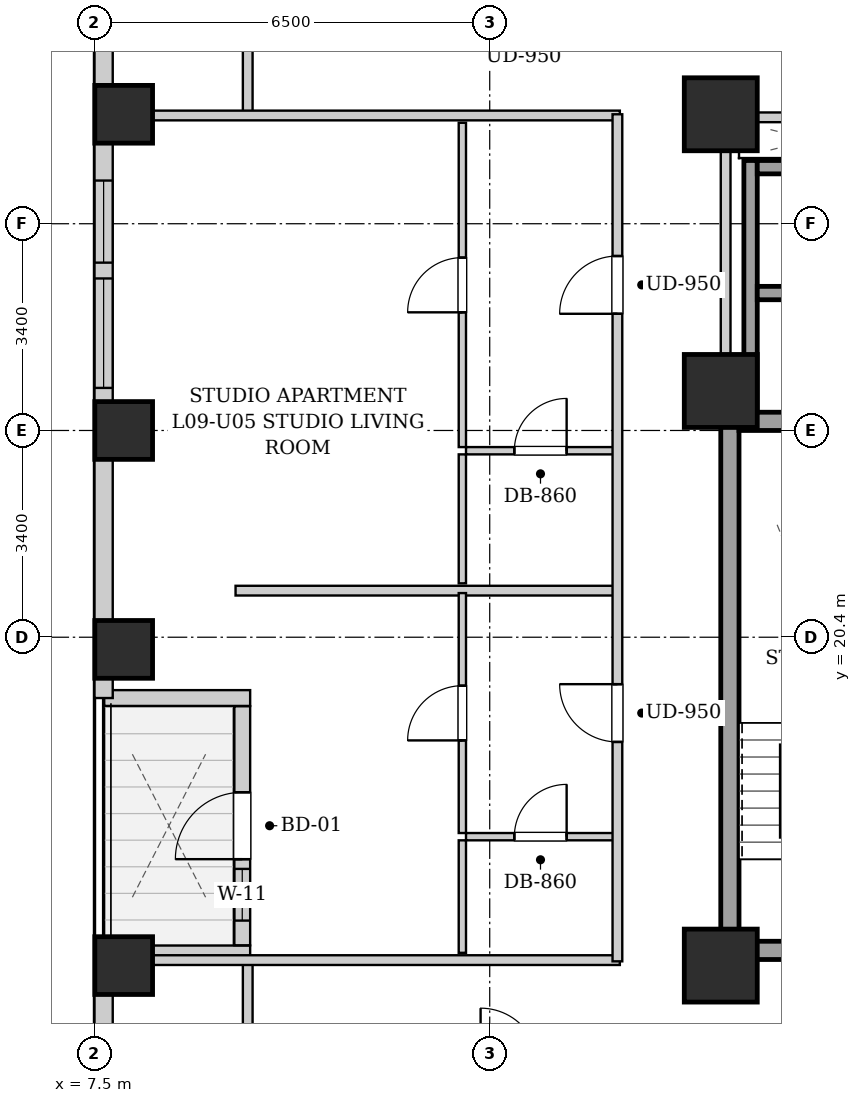
"""IFC4 building model, lengths in metres.
Left out: names, types, materials, properties, quantities, classifications, styles, units other than length and angle.
Written with IfcOpenShell. Run it as: python <this file> out.ifc"""

import sys

from ifc_helpers import new_model, si_unit, direction, frame, frame_2d, origin, origin_2d, place, context, subcontext, project, spatial, rectangle, extrude, element, fill, save


model = new_model("IFC4")
c1 = context("Model", 3, precision=1e-05, world=origin(), true_north=direction((0.0, 1.0)))
c2 = subcontext(c1, "Body", "Model", "MODEL_VIEW")
j1 = project(units=[si_unit("LENGTHUNIT", "METRE"), si_unit("PLANEANGLEUNIT", "RADIAN")], contexts=[c1])
p1 = place(None, origin())
s1 = spatial("IfcSite", under=j1, at=p1, CompositionType="ELEMENT")
p2 = place(p1, origin())
s2 = spatial("IfcBuilding", under=s1, at=p2, CompositionType="ELEMENT")
p3 = place(p2, frame((0.0, 0.0, 38.6)))
s3 = spatial("IfcBuildingStorey", under=s2, at=p3, CompositionType="ELEMENT", Elevation=38.6)
for number, where, z_axis, x_axis in (
    (1, (7.98, 15.0, 0.0), (0.0, 0.0, 1.0), (1.0, 0.0, 0.0)),
    (2, (7.98, 20.2, 0.0), (0.0, 0.0, 1.0), (1.0, 0.0, 0.0)),
    (3, (7.98, 23.8, 0.0), (0.0, 0.0, 1.0), (1.0, 0.0, 0.0)),
    (4, (7.98, 29.0, 0.0), (0.0, 0.0, 1.0), (1.0, 0.0, 0.0)),
):
    element("IfcColumn", number, at=place(p3, frame(where, z_axis=z_axis, x_axis=x_axis)), inside=s3, PredefinedType="COLUMN", context=c2, shape_type="SweptSolid", body=[
        extrude(rectangle(XDim=0.95, YDim=0.95, at=origin_2d()), origin(), (0.0, 0.0, 1.0), 3.2),
    ])
for number, where, z_axis, x_axis in (
    (5, (17.8, 15.0, 0.0), (0.0, 0.0, 1.0), (1.0, 0.0, 0.0)),
    (6, (17.8, 29.0, 0.0), (0.0, 0.0, 1.0), (1.0, 0.0, 0.0)),
    (7, (17.8, 24.45, 0.0), (0.0, 0.0, 1.0), (1.0, 0.0, 0.0)),
):
    element("IfcColumn", number, at=place(p3, frame(where, z_axis=z_axis, x_axis=x_axis)), inside=s3, PredefinedType="COLUMN", context=c2, shape_type="SweptSolid", body=[
        extrude(rectangle(XDim=1.2, YDim=1.2, at=origin_2d()), origin(), (0.0, 0.0, 1.0), 3.2),
    ])
p4 = place(p3, frame((7.65, 2.5, 0.0), z_axis=(0.0, 0.0, 1.0), x_axis=(0.0, 1.0, 0.0)))
e8 = element("IfcWall", 8, at=p4, inside=s3, PredefinedType="SOLIDWALL", context=c2, shape_type="SweptSolid", body=[
    extrude(rectangle(XDim=12.7, YDim=0.3, at=frame_2d((6.35, 0.0))), origin(), (0.0, 0.0, 1.0), 1.975),
])
p5 = place(p4, frame((3.257, 0.0, 0.55)))
e9 = element("IfcOpeningElement", 9, at=p5, cuts=e8, PredefinedType="OPENING", context=c2, shape_type="SweptSolid", body=[
    extrude(rectangle(XDim=1.8, YDim=1.2, at=frame_2d((0.9, 0.6))), frame((0.0, 0.16, 0.0), z_axis=(0.0, -1.0, 0.0), x_axis=(1.0, 0.0, 0.0)), (0.0, 0.0, 1.0), 0.32),
])
p6 = place(p4, frame((1.185, 0.0, 0.55)))
e10 = element("IfcOpeningElement", 10, at=p6, cuts=e8, PredefinedType="OPENING", context=c2, shape_type="SweptSolid", body=[
    extrude(rectangle(XDim=1.35, YDim=1.2, at=frame_2d((0.675, 0.6))), frame((0.0, 0.16, 0.0), z_axis=(0.0, -1.0, 0.0), x_axis=(1.0, 0.0, 0.0)), (0.0, 0.0, 1.0), 0.32),
])
p7 = place(p3, frame((7.66, 15.2, 0.0), z_axis=(0.0, 0.0, 1.0), x_axis=(1.0, 0.0, 0.0)))
e11 = element("IfcWall", 11, at=p7, inside=s3, PredefinedType="SOLIDWALL", context=c2, shape_type="SweptSolid", body=[
    extrude(rectangle(XDim=2.4, YDim=0.26, at=frame_2d((1.2, 0.0))), origin(), (0.0, 0.0, 1.0), 2.94),
])
p8 = place(p3, frame((9.93, 15.334, 0.0), z_axis=(0.0, 0.0, 1.0), x_axis=(0.0, 1.0, 0.0)))
e12 = element("IfcWall", 12, at=p8, inside=s3, PredefinedType="SOLIDWALL", context=c2, shape_type="SweptSolid", body=[
    extrude(rectangle(XDim=3.932, YDim=0.26, at=frame_2d((1.966, 0.0))), origin(), (0.0, 0.0, 1.0), 2.94),
])
p9 = place(p8, frame((1.416, 0.0, 0.0)))
e13 = element("IfcOpeningElement", 13, at=p9, cuts=e12, PredefinedType="OPENING", context=c2, shape_type="SweptSolid", body=[
    extrude(rectangle(XDim=1.1, YDim=2.0, at=frame_2d((0.55, 1.0))), frame((0.0, 0.14, 0.0), z_axis=(0.0, -1.0, 0.0), x_axis=(1.0, 0.0, 0.0)), (0.0, 0.0, 1.0), 0.28),
])
p10 = place(p8, frame((0.406, 0.0, 0.55)))
e14 = element("IfcOpeningElement", 14, at=p10, cuts=e12, PredefinedType="OPENING", context=c2, shape_type="SweptSolid", body=[
    extrude(rectangle(XDim=0.85, YDim=1.2, at=frame_2d((0.425, 0.6))), frame((0.0, 0.14, 0.0), z_axis=(0.0, -1.0, 0.0), x_axis=(1.0, 0.0, 0.0)), (0.0, 0.0, 1.0), 0.28),
])
p11 = place(p3, frame((10.06, 19.4, 0.0), z_axis=(0.0, 0.0, 1.0), x_axis=(-1.0, 0.0, 0.0)))
e15 = element("IfcWall", 15, at=p11, inside=s3, PredefinedType="SOLIDWALL", context=c2, shape_type="SweptSolid", body=[
    extrude(rectangle(XDim=2.4, YDim=0.26, at=frame_2d((1.2, 0.0))), origin(), (0.0, 0.0, 1.0), 2.94),
])
p12 = place(p3, frame((7.65, 19.4, 0.0), z_axis=(0.0, 0.0, 1.0), x_axis=(0.0, 1.0, 0.0)))
e16 = element("IfcWall", 16, at=p12, inside=s3, PredefinedType="SOLIDWALL", context=c2, shape_type="SweptSolid", body=[
    extrude(rectangle(XDim=25.7, YDim=0.3, at=frame_2d((12.85, 0.0))), origin(), (0.0, 0.0, 1.0), 1.975),
])
p13 = place(p12, frame((20.235, 0.0, 0.55)))
e17 = element("IfcOpeningElement", 17, at=p13, cuts=e16, PredefinedType="OPENING", context=c2, shape_type="SweptSolid", body=[
    extrude(rectangle(XDim=1.8, YDim=1.2, at=frame_2d((0.9, 0.6))), frame((0.0, 0.16, 0.0), z_axis=(0.0, -1.0, 0.0), x_axis=(1.0, 0.0, 0.0)), (0.0, 0.0, 1.0), 0.32),
])
p14 = place(p12, frame((14.635, 0.0, 0.55)))
e18 = element("IfcOpeningElement", 18, at=p14, cuts=e16, PredefinedType="OPENING", context=c2, shape_type="SweptSolid", body=[
    extrude(rectangle(XDim=1.35, YDim=1.2, at=frame_2d((0.675, 0.6))), frame((0.0, 0.16, 0.0), z_axis=(0.0, -1.0, 0.0), x_axis=(1.0, 0.0, 0.0)), (0.0, 0.0, 1.0), 0.32),
])
p15 = place(p12, frame((5.1, 0.0, 0.55)))
e19 = element("IfcOpeningElement", 19, at=p15, cuts=e16, PredefinedType="OPENING", context=c2, shape_type="SweptSolid", body=[
    extrude(rectangle(XDim=1.8, YDim=1.2, at=frame_2d((0.9, 0.6))), frame((0.0, 0.16, 0.0), z_axis=(0.0, -1.0, 0.0), x_axis=(1.0, 0.0, 0.0)), (0.0, 0.0, 1.0), 0.32),
])
p16 = place(p12, frame((7.16, 0.0, 0.55)))
e20 = element("IfcOpeningElement", 20, at=p16, cuts=e16, PredefinedType="OPENING", context=c2, shape_type="SweptSolid", body=[
    extrude(rectangle(XDim=1.35, YDim=1.2, at=frame_2d((0.675, 0.6))), frame((0.0, 0.16, 0.0), z_axis=(0.0, -1.0, 0.0), x_axis=(1.0, 0.0, 0.0)), (0.0, 0.0, 1.0), 0.32),
])
p17 = place(p3, frame((17.95, 15.1, 0.0), z_axis=(0.0, 0.0, 1.0), x_axis=(0.0, 1.0, 0.0)))
e21 = element("IfcWall", 21, at=p17, inside=s3, PredefinedType="SHEAR", context=c2, shape_type="SweptSolid", body=[
    extrude(rectangle(XDim=9.0, YDim=0.3, at=frame_2d((4.5, 0.0))), origin(), (0.0, 0.0, 1.0), 2.94),
])
p18 = place(p3, frame((18.1, 23.95, 0.0), z_axis=(0.0, 0.0, 1.0), x_axis=(1.0, 0.0, 0.0)))
e22 = element("IfcWall", 22, at=p18, inside=s3, PredefinedType="SHEAR", context=c2, shape_type="SweptSolid", body=[
    extrude(rectangle(XDim=2.85, YDim=0.3, at=frame_2d((1.425, 0.0))), origin(), (0.0, 0.0, 1.0), 2.94),
])
p19 = place(p3, frame((18.1, 15.25, 0.0), z_axis=(0.0, 0.0, 1.0), x_axis=(1.0, 0.0, 0.0)))
e23 = element("IfcWall", 23, at=p19, inside=s3, PredefinedType="SHEAR", context=c2, shape_type="SweptSolid", body=[
    extrude(rectangle(XDim=2.85, YDim=0.3, at=frame_2d((1.425, 0.0))), origin(), (0.0, 0.0, 1.0), 2.94),
])
p20 = place(p19, frame((0.86, 0.0, 0.0)))
e24 = element("IfcOpeningElement", 24, at=p20, cuts=e23, PredefinedType="OPENING", context=c2, shape_type="SweptSolid", body=[
    extrude(rectangle(XDim=1.1, YDim=2.05, at=frame_2d((0.55, 1.025))), frame((0.0, 0.16, 0.0), z_axis=(0.0, -1.0, 0.0), x_axis=(1.0, 0.0, 0.0)), (0.0, 0.0, 1.0), 0.32),
])
p21 = place(p3, frame((18.29, 24.1, 0.0), z_axis=(0.0, 0.0, 1.0), x_axis=(0.0, 1.0, 0.0)))
e25 = element("IfcWall", 25, at=p21, inside=s3, PredefinedType="SHEAR", context=c2, shape_type="SweptSolid", body=[
    extrude(rectangle(XDim=4.14, YDim=0.22, at=frame_2d((2.07, 0.0))), origin(), (0.0, 0.0, 1.0), 2.94),
])
for number, where, z_axis, x_axis in (
    (26, (18.4, 26.06, 0.0), (0.0, 0.0, 1.0), (1.0, 0.0, 0.0)),
    (27, (18.4, 28.13, 0.0), (0.0, 0.0, 1.0), (1.0, 0.0, 0.0)),
):
    element("IfcWall", number, at=place(p3, frame(where, z_axis=z_axis, x_axis=x_axis)), inside=s3, PredefinedType="SHEAR", context=c2, shape_type="SweptSolid", body=[
        extrude(rectangle(XDim=1.9, YDim=0.22, at=frame_2d((0.95, 0.0))), origin(), (0.0, 0.0, 1.0), 2.94),
    ])
p22 = place(p3, frame((17.88, 24.12, 0.0), z_axis=(0.0, 0.0, 1.0), x_axis=(0.0, 1.0, 0.0)))
e28 = element("IfcWall", 28, at=p22, inside=s3, PredefinedType="PARTITIONING", context=c2, shape_type="SweptSolid", body=[
    extrude(rectangle(XDim=4.76, YDim=0.16, at=frame_2d((2.38, 0.0))), origin(), (0.0, 0.0, 1.0), 2.275),
])
p23 = place(p3, frame((17.96, 28.95, 0.0), z_axis=(0.0, 0.0, 1.0), x_axis=(1.0, 0.0, 0.0)))
e29 = element("IfcWall", 29, at=p23, inside=s3, PredefinedType="PARTITIONING", context=c2, shape_type="SweptSolid", body=[
    extrude(rectangle(XDim=4.29, YDim=0.16, at=frame_2d((2.145, 0.0))), origin(), (0.0, 0.0, 1.0), 2.155),
])
p24 = place(p23, frame((1.57, 0.0, 0.0)))
e30 = element("IfcOpeningElement", 30, at=p24, cuts=e29, PredefinedType="OPENING", context=c2, shape_type="SweptSolid", body=[
    extrude(rectangle(XDim=0.86, YDim=2.05, at=frame_2d((0.43, 1.025))), frame((0.0, 0.09, 0.0), z_axis=(0.0, -1.0, 0.0), x_axis=(1.0, 0.0, 0.0)), (0.0, 0.0, 1.0), 0.18),
])
for number, where, z_axis, x_axis in (
    (31, (10.02, 13.35, 0.0), (0.0, 0.0, 1.0), (0.0, 1.0, 0.0)),
    (32, (10.02, 28.98, 0.0), (0.0, 0.0, 1.0), (0.0, 1.0, 0.0)),
):
    element("IfcWall", number, at=place(p3, frame(where, z_axis=z_axis, x_axis=x_axis)), inside=s3, PredefinedType="PARTITIONING", context=c2, shape_type="SweptSolid", body=[
        extrude(rectangle(XDim=1.74, YDim=0.16, at=frame_2d((0.87, 0.0))), origin(), (0.0, 0.0, 1.0), 2.94),
    ])
for number, where, z_axis, x_axis in (
    (33, (7.78, 15.09, 0.0), (0.0, 0.0, 1.0), (1.0, 0.0, 0.0)),
    (34, (7.78, 28.98, 0.0), (0.0, 0.0, 1.0), (1.0, 0.0, 0.0)),
):
    element("IfcWall", number, at=place(p3, frame(where, z_axis=z_axis, x_axis=x_axis)), inside=s3, PredefinedType="PARTITIONING", context=c2, shape_type="SweptSolid", body=[
        extrude(rectangle(XDim=8.36, YDim=0.16, at=frame_2d((4.18, 0.0))), origin(), (0.0, 0.0, 1.0), 2.155),
    ])
p25 = place(p3, frame((9.82, 21.166, 0.0), z_axis=(0.0, 0.0, 1.0), x_axis=(1.0, 0.0, 0.0)))
e35 = element("IfcWall", 35, at=p25, inside=s3, PredefinedType="PARTITIONING", context=c2, shape_type="SweptSolid", body=[
    extrude(rectangle(XDim=6.24, YDim=0.16, at=frame_2d((3.12, 0.0))), origin(), (0.0, 0.0, 1.0), 2.94),
])
p26 = place(p3, frame((13.61, 17.12, 0.0), z_axis=(0.0, 0.0, 1.0), x_axis=(1.0, 0.0, 0.0)))
e36 = element("IfcWall", 36, at=p26, inside=s3, PredefinedType="PARTITIONING", context=c2, shape_type="SweptSolid", body=[
    extrude(rectangle(XDim=2.45, YDim=0.12, at=frame_2d((1.225, 0.0))), origin(), (0.0, 0.0, 1.0), 2.94),
])
p27 = place(p26, frame((0.795, 0.0, 0.0)))
e37 = element("IfcOpeningElement", 37, at=p27, cuts=e36, PredefinedType="OPENING", context=c2, shape_type="SweptSolid", body=[
    extrude(rectangle(XDim=0.86, YDim=2.05, at=frame_2d((0.43, 1.025))), frame((0.0, 0.07, 0.0), z_axis=(0.0, -1.0, 0.0), x_axis=(1.0, 0.0, 0.0)), (0.0, 0.0, 1.0), 0.14),
])
p28 = place(p3, frame((13.55, 15.21, 0.0), z_axis=(0.0, 0.0, 1.0), x_axis=(0.0, 1.0, 0.0)))
e38 = element("IfcWall", 38, at=p28, inside=s3, PredefinedType="PARTITIONING", context=c2, shape_type="SweptSolid", body=[
    extrude(rectangle(XDim=1.85, YDim=0.12, at=frame_2d((0.925, 0.0))), origin(), (0.0, 0.0, 1.0), 2.94),
])
p29 = place(p3, frame((13.55, 17.18, 0.0), z_axis=(0.0, 0.0, 1.0), x_axis=(0.0, 1.0, 0.0)))
e39 = element("IfcWall", 39, at=p29, inside=s3, PredefinedType="PARTITIONING", context=c2, shape_type="SweptSolid", body=[
    extrude(rectangle(XDim=3.946, YDim=0.12, at=frame_2d((1.973, 0.0))), origin(), (0.0, 0.0, 1.0), 2.94),
])
p30 = place(p29, frame((1.523, 0.0, 0.0)))
e40 = element("IfcOpeningElement", 40, at=p30, cuts=e39, PredefinedType="OPENING", context=c2, shape_type="SweptSolid", body=[
    extrude(rectangle(XDim=0.9, YDim=2.05, at=frame_2d((0.45, 1.025))), frame((0.0, 0.07, 0.0), z_axis=(0.0, -1.0, 0.0), x_axis=(1.0, 0.0, 0.0)), (0.0, 0.0, 1.0), 0.14),
])
p31 = place(p3, frame((13.61, 23.467, 0.0), z_axis=(0.0, 0.0, 1.0), x_axis=(1.0, 0.0, 0.0)))
e41 = element("IfcWall", 41, at=p31, inside=s3, PredefinedType="PARTITIONING", context=c2, shape_type="SweptSolid", body=[
    extrude(rectangle(XDim=2.45, YDim=0.12, at=frame_2d((1.225, 0.0))), origin(), (0.0, 0.0, 1.0), 2.94),
])
p32 = place(p31, frame((0.795, 0.0, 0.0)))
e42 = element("IfcOpeningElement", 42, at=p32, cuts=e41, PredefinedType="OPENING", context=c2, shape_type="SweptSolid", body=[
    extrude(rectangle(XDim=0.86, YDim=2.05, at=frame_2d((0.43, 1.025))), frame((0.0, 0.07, 0.0), z_axis=(0.0, -1.0, 0.0), x_axis=(1.0, 0.0, 0.0)), (0.0, 0.0, 1.0), 0.14),
])
p33 = place(p3, frame((13.55, 21.286, 0.0), z_axis=(0.0, 0.0, 1.0), x_axis=(0.0, 1.0, 0.0)))
e43 = element("IfcWall", 43, at=p33, inside=s3, PredefinedType="PARTITIONING", context=c2, shape_type="SweptSolid", body=[
    extrude(rectangle(XDim=2.121, YDim=0.12, at=frame_2d((1.061, 0.0))), origin(), (0.0, 0.0, 1.0), 2.94),
])
p34 = place(p3, frame((13.55, 23.527, 0.0), z_axis=(0.0, 0.0, 1.0), x_axis=(0.0, 1.0, 0.0)))
e44 = element("IfcWall", 44, at=p34, inside=s3, PredefinedType="PARTITIONING", context=c2, shape_type="SweptSolid", body=[
    extrude(rectangle(XDim=5.333, YDim=0.12, at=frame_2d((2.667, 0.0))), origin(), (0.0, 0.0, 1.0), 2.94),
])
p35 = place(p34, frame((2.216, 0.0, 0.0)))
e45 = element("IfcOpeningElement", 45, at=p35, cuts=e44, PredefinedType="OPENING", context=c2, shape_type="SweptSolid", body=[
    extrude(rectangle(XDim=0.9, YDim=2.05, at=frame_2d((0.45, 1.025))), frame((0.0, 0.07, 0.0), z_axis=(0.0, -1.0, 0.0), x_axis=(1.0, 0.0, 0.0)), (0.0, 0.0, 1.0), 0.14),
])
p36 = place(p3, frame((16.1, 15.07, 0.0), z_axis=(0.0, 0.0, 1.0), x_axis=(0.0, 1.0, 0.0)))
e46 = element("IfcWall", 46, at=p36, inside=s3, PredefinedType="PARTITIONING", context=c2, shape_type="SweptSolid", body=[
    extrude(rectangle(XDim=13.93, YDim=0.16, at=frame_2d((6.965, 0.0))), origin(), (0.0, 0.0, 1.0), 2.94),
])
p37 = place(p36, frame((3.608, 0.0, 0.0)))
e47 = element("IfcOpeningElement", 47, at=p37, cuts=e46, PredefinedType="OPENING", context=c2, shape_type="SweptSolid", body=[
    extrude(rectangle(XDim=0.95, YDim=2.1, at=frame_2d((0.475, 1.05))), frame((0.0, 0.09, 0.0), z_axis=(0.0, -1.0, 0.0), x_axis=(1.0, 0.0, 0.0)), (0.0, 0.0, 1.0), 0.18),
])
p38 = place(p36, frame((10.649, 0.0, 0.0)))
e48 = element("IfcOpeningElement", 48, at=p38, cuts=e46, PredefinedType="OPENING", context=c2, shape_type="SweptSolid", body=[
    extrude(rectangle(XDim=0.95, YDim=2.1, at=frame_2d((0.475, 1.05))), frame((0.0, 0.09, 0.0), z_axis=(0.0, -1.0, 0.0), x_axis=(1.0, 0.0, 0.0)), (0.0, 0.0, 1.0), 0.18),
])
p39 = place(p27, origin())
e49 = element("IfcDoor", 49, at=p39, inside=s3, OperationType="SINGLE_SWING_RIGHT", PredefinedType="DOOR", context=c2, shape_type="SweptSolid", body=[
    extrude(rectangle(XDim=0.86, YDim=2.05, at=frame_2d((0.43, 1.025))), frame((0.0, 0.025, 0.0), z_axis=(0.0, -1.0, 0.0), x_axis=(1.0, 0.0, 0.0)), (0.0, 0.0, 1.0), 0.05),
])
fill(e37, e49)
p40 = place(p30, origin())
e50 = element("IfcDoor", 50, at=p40, inside=s3, OperationType="SINGLE_SWING_LEFT", PredefinedType="DOOR", context=c2, shape_type="SweptSolid", body=[
    extrude(rectangle(XDim=0.9, YDim=2.05, at=frame_2d((0.45, 1.025))), frame((0.0, 0.025, 0.0), z_axis=(0.0, -1.0, 0.0), x_axis=(1.0, 0.0, 0.0)), (0.0, 0.0, 1.0), 0.05),
])
fill(e40, e50)
p41 = place(p32, origin())
e51 = element("IfcDoor", 51, at=p41, inside=s3, OperationType="SINGLE_SWING_RIGHT", PredefinedType="DOOR", context=c2, shape_type="SweptSolid", body=[
    extrude(rectangle(XDim=0.86, YDim=2.05, at=frame_2d((0.43, 1.025))), frame((0.0, 0.025, 0.0), z_axis=(0.0, -1.0, 0.0), x_axis=(1.0, 0.0, 0.0)), (0.0, 0.0, 1.0), 0.05),
])
fill(e42, e51)
p42 = place(p35, origin())
e52 = element("IfcDoor", 52, at=p42, inside=s3, OperationType="SINGLE_SWING_LEFT", PredefinedType="DOOR", context=c2, shape_type="SweptSolid", body=[
    extrude(rectangle(XDim=0.9, YDim=2.05, at=frame_2d((0.45, 1.025))), frame((0.0, 0.025, 0.0), z_axis=(0.0, -1.0, 0.0), x_axis=(1.0, 0.0, 0.0)), (0.0, 0.0, 1.0), 0.05),
])
fill(e45, e52)
p43 = place(p37, origin())
e53 = element("IfcDoor", 53, at=p43, inside=s3, OperationType="SINGLE_SWING_RIGHT", PredefinedType="DOOR", context=c2, shape_type="SweptSolid", body=[
    extrude(rectangle(XDim=0.95, YDim=2.1, at=frame_2d((0.475, 1.05))), frame((0.0, 0.025, 0.0), z_axis=(0.0, -1.0, 0.0), x_axis=(1.0, 0.0, 0.0)), (0.0, 0.0, 1.0), 0.05),
])
fill(e47, e53)
p44 = place(p38, origin())
e54 = element("IfcDoor", 54, at=p44, inside=s3, OperationType="SINGLE_SWING_LEFT", PredefinedType="DOOR", context=c2, shape_type="SweptSolid", body=[
    extrude(rectangle(XDim=0.95, YDim=2.1, at=frame_2d((0.475, 1.05))), frame((0.0, 0.025, 0.0), z_axis=(0.0, -1.0, 0.0), x_axis=(1.0, 0.0, 0.0)), (0.0, 0.0, 1.0), 0.05),
])
fill(e48, e54)
p45 = place(p9, origin())
e55 = element("IfcDoor", 55, at=p45, inside=s3, OperationType="SINGLE_SWING_LEFT", PredefinedType="DOOR", context=c2, shape_type="SweptSolid", body=[
    extrude(rectangle(XDim=1.1, YDim=2.0, at=frame_2d((0.55, 1.0))), frame((0.0, 0.025, 0.0), z_axis=(0.0, -1.0, 0.0), x_axis=(1.0, 0.0, 0.0)), (0.0, 0.0, 1.0), 0.05),
])
fill(e13, e55)
p46 = place(p10, origin())
e56 = element("IfcWindow", 56, at=p46, inside=s3, PartitioningType="SINGLE_PANEL", PredefinedType="WINDOW", context=c2, shape_type="SweptSolid", body=[
    extrude(rectangle(XDim=0.85, YDim=1.2, at=frame_2d((0.425, 0.6))), frame((0.0, 0.03, 0.0), z_axis=(0.0, -1.0, 0.0), x_axis=(1.0, 0.0, 0.0)), (0.0, 0.0, 1.0), 0.06),
])
fill(e14, e56)
p47 = place(p15, origin())
e57 = element("IfcWindow", 57, at=p47, inside=s3, PartitioningType="DOUBLE_PANEL_VERTICAL", PredefinedType="WINDOW", context=c2, shape_type="SweptSolid", body=[
    extrude(rectangle(XDim=1.8, YDim=1.2, at=frame_2d((0.9, 0.6))), frame((0.0, 0.03, 0.0), z_axis=(0.0, -1.0, 0.0), x_axis=(1.0, 0.0, 0.0)), (0.0, 0.0, 1.0), 0.06),
])
fill(e19, e57)
p48 = place(p16, origin())
e58 = element("IfcWindow", 58, at=p48, inside=s3, PartitioningType="SINGLE_PANEL", PredefinedType="WINDOW", context=c2, shape_type="SweptSolid", body=[
    extrude(rectangle(XDim=1.35, YDim=1.2, at=frame_2d((0.675, 0.6))), frame((0.0, 0.03, 0.0), z_axis=(0.0, -1.0, 0.0), x_axis=(1.0, 0.0, 0.0)), (0.0, 0.0, 1.0), 0.06),
])
fill(e20, e58)
save(model, sys.argv[1])
